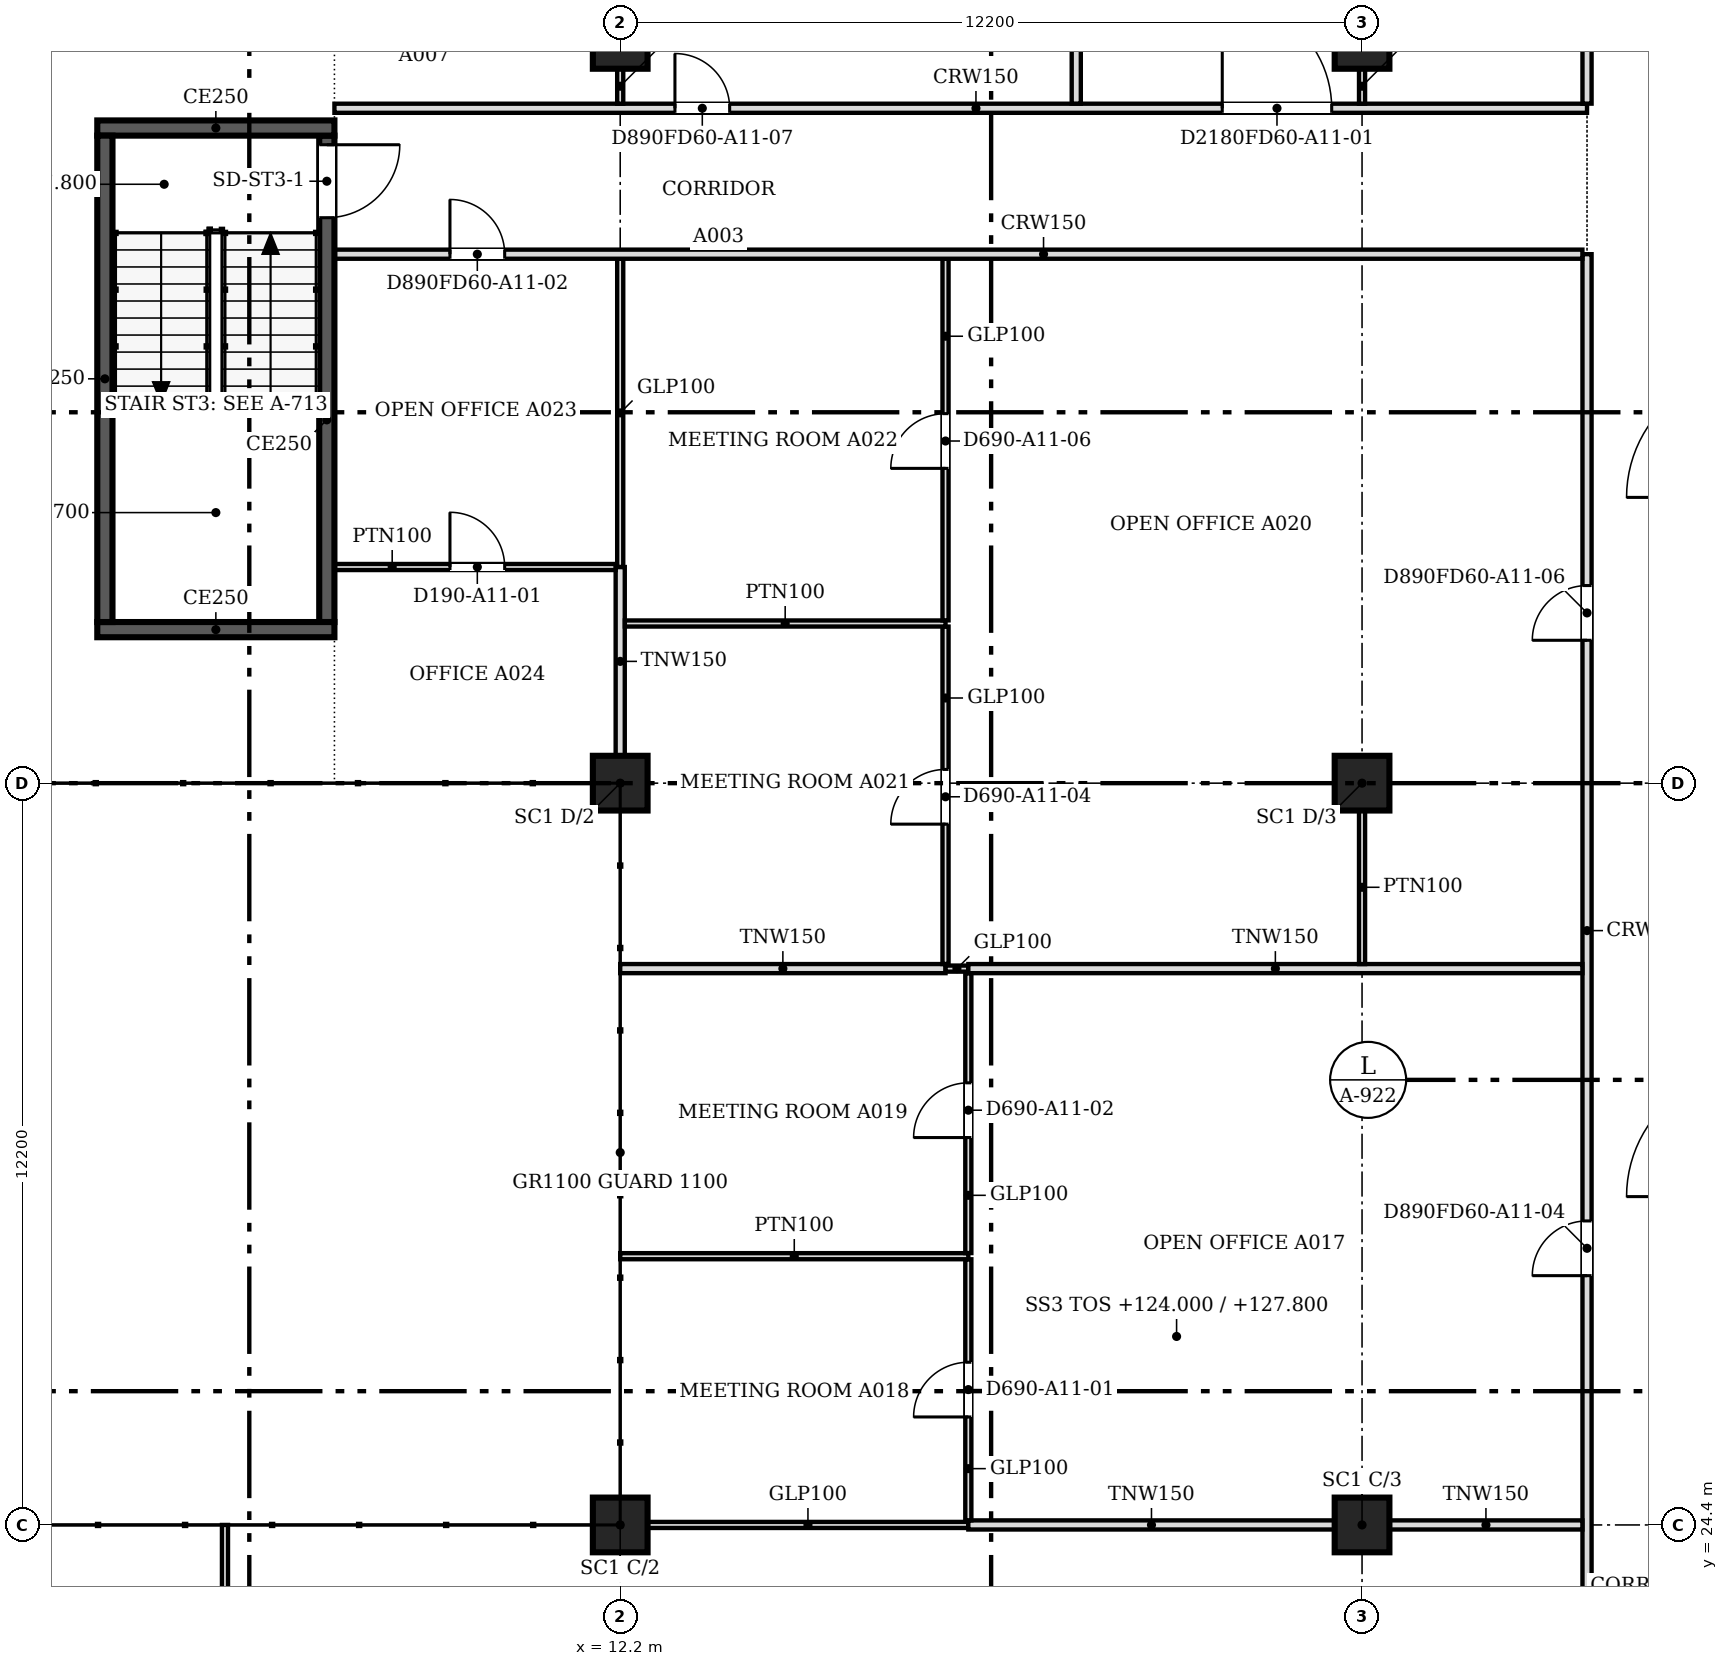
"""IFC4 building model, lengths in metres.
Left out: names, types, materials, properties, quantities, classifications, styles, units other than length and angle.
Written with IfcOpenShell. Run it as: python <this file> out.ifc"""

import sys

from ifc_helpers import new_model, si_unit, direction, frame, frame_2d, origin, origin_2d, place, context, subcontext, project, spatial, rectangle, extrude, source, transform, mapped, element, fill, save


model = new_model("IFC4")
c1 = context("Model", 3, precision=1e-05, world=origin(), true_north=direction((0.0, 1.0)))
c2 = subcontext(c1, "Body", "Model", "MODEL_VIEW")
j1 = project(units=[si_unit("LENGTHUNIT", "METRE"), si_unit("PLANEANGLEUNIT", "RADIAN")], contexts=[c1])
p1 = place(None, origin())
s1 = spatial("IfcSite", under=j1, at=p1, CompositionType="ELEMENT")
p2 = place(p1, origin())
s2 = spatial("IfcBuilding", under=s1, at=p2, CompositionType="ELEMENT")
p3 = place(p2, frame((0.0, 0.0, 124.0)))
s3 = spatial("IfcBuildingStorey", under=s2, at=p3, CompositionType="ELEMENT", Elevation=124.0)
for number, where, z_axis, x_axis in (
    (1, (12.2, 24.4, 0.0), (0.0, 0.0, 1.0), (1.0, 0.0, 0.0)),
    (2, (12.2, 36.6, 0.0), (0.0, 0.0, 1.0), (1.0, 0.0, 0.0)),
    (3, (12.2, 48.8, 0.0), (0.0, 0.0, 1.0), (1.0, 0.0, 0.0)),
    (4, (24.4, 24.4, 0.0), (0.0, 0.0, 1.0), (1.0, 0.0, 0.0)),
    (5, (24.4, 36.6, 0.0), (0.0, 0.0, 1.0), (1.0, 0.0, 0.0)),
    (6, (24.4, 48.8, 0.0), (0.0, 0.0, 1.0), (1.0, 0.0, 0.0)),
):
    element("IfcColumn", number, at=place(p3, frame(where, z_axis=z_axis, x_axis=x_axis)), inside=s3, PredefinedType="COLUMN", context=c2, shape_type="SweptSolid", body=[
        extrude(rectangle(XDim=0.9, YDim=0.9, at=origin_2d()), origin(), (0.0, 0.0, 1.0), 3.6),
    ])
p4 = place(p3, frame((7.5, 39.125, 0.0), z_axis=(0.0, 0.0, 1.0), x_axis=(-1.0, 0.0, 0.0)))
e7 = element("IfcWall", 7, at=p4, inside=s3, PredefinedType="SOLIDWALL", context=c2, shape_type="SweptSolid", body=[
    extrude(rectangle(XDim=3.9, YDim=0.25, at=frame_2d((1.95, 0.0))), origin(), (0.0, 0.0, 1.0), 3.8),
])
p5 = place(p3, frame((3.725, 39.25, 0.0), z_axis=(0.0, 0.0, 1.0), x_axis=(0.0, 1.0, 0.0)))
e8 = element("IfcWall", 8, at=p5, inside=s3, PredefinedType="SOLIDWALL", context=c2, shape_type="SweptSolid", body=[
    extrude(rectangle(XDim=8.0, YDim=0.25, at=frame_2d((4.0, 0.0))), origin(), (0.0, 0.0, 1.0), 3.8),
])
p6 = place(p3, frame((3.6, 47.375, 0.0), z_axis=(0.0, 0.0, 1.0), x_axis=(1.0, 0.0, 0.0)))
e9 = element("IfcWall", 9, at=p6, inside=s3, PredefinedType="SOLIDWALL", context=c2, shape_type="SweptSolid", body=[
    extrude(rectangle(XDim=3.9, YDim=0.25, at=frame_2d((1.95, 0.0))), origin(), (0.0, 0.0, 1.0), 3.8),
])
p7 = place(p3, frame((7.375, 47.25, 0.0), z_axis=(0.0, 0.0, 1.0), x_axis=(0.0, -1.0, 0.0)))
e10 = element("IfcWall", 10, at=p7, inside=s3, PredefinedType="SOLIDWALL", context=c2, shape_type="SweptSolid", body=[
    extrude(rectangle(XDim=8.0, YDim=0.25, at=frame_2d((4.0, 0.0))), origin(), (0.0, 0.0, 1.0), 3.8),
])
m1 = source(origin(), c2, "Body", "SweptSolid", [
    extrude(rectangle(XDim=1.2, YDim=2.1, at=frame_2d((0.6, 1.05))), frame((0.0, 0.135, 0.0), z_axis=(0.0, -1.0, 0.0), x_axis=(1.0, 0.0, 0.0)), (0.0, 0.0, 1.0), 0.27),
])
p8 = place(p7, frame((0.15, 0.0, 0.0)))
e11 = element("IfcOpeningElement", 11, at=p8, cuts=e10, PredefinedType="OPENING", context=c2, shape_type="MappedRepresentation", body=[
    mapped(m1, transform((0.0, 0.0, 0.0), scale=1.0)),
])
p9 = place(p3, frame((28.1, 18.8, 0.0), z_axis=(0.0, 0.0, 1.0), x_axis=(0.0, 1.0, 0.0)))
e12 = element("IfcWall", 12, at=p9, inside=s3, PredefinedType="PARTITIONING", context=c2, shape_type="SweptSolid", body=[
    extrude(rectangle(XDim=26.5, YDim=0.15, at=frame_2d((13.25, 0.0))), origin(), (0.0, 0.0, 1.0), 3.067),
])
m2 = source(origin(), c2, "Body", "SweptSolid", [
    extrude(rectangle(XDim=0.9, YDim=2.1, at=frame_2d((0.45, 1.05))), frame((0.0, 0.085, 0.0), z_axis=(0.0, -1.0, 0.0), x_axis=(1.0, 0.0, 0.0)), (0.0, 0.0, 1.0), 0.17),
])
p10 = place(p9, frame((1.1, 0.0, 0.0)))
e13 = element("IfcOpeningElement", 13, at=p10, cuts=e12, PredefinedType="OPENING", context=c2, shape_type="MappedRepresentation", body=[
    mapped(m2, transform((0.0, 0.0, 0.0), scale=1.0)),
])
p11 = place(p9, frame((9.7, 0.0, 0.0)))
e14 = element("IfcOpeningElement", 14, at=p11, cuts=e12, PredefinedType="OPENING", context=c2, shape_type="MappedRepresentation", body=[
    mapped(m2, transform((0.0, 0.0, 0.0), scale=1.0)),
])
p12 = place(p9, frame((20.15, 0.0, 0.0)))
e15 = element("IfcOpeningElement", 15, at=p12, cuts=e12, PredefinedType="OPENING", context=c2, shape_type="MappedRepresentation", body=[
    mapped(m2, transform((0.0, 0.0, 0.0), scale=1.0)),
])
p13 = place(p3, frame((5.7, 18.99, 0.0), z_axis=(0.0, 0.0, 1.0), x_axis=(0.0, 1.0, 0.0)))
e16 = element("IfcWall", 16, at=p13, inside=s3, PredefinedType="PARTITIONING", context=c2, shape_type="SweptSolid", body=[
    extrude(rectangle(XDim=5.41, YDim=0.1, at=frame_2d((2.705, 0.0))), origin(), (0.0, 0.0, 1.0), 3.067),
])
m3 = source(origin(), c2, "Body", "SweptSolid", [
    extrude(rectangle(XDim=0.9, YDim=2.1, at=frame_2d((0.45, 1.05))), frame((0.0, 0.06, 0.0), z_axis=(0.0, -1.0, 0.0), x_axis=(1.0, 0.0, 0.0)), (0.0, 0.0, 1.0), 0.12),
])
p14 = place(p13, frame((2.3, 0.0, 0.0)))
e17 = element("IfcOpeningElement", 17, at=p14, cuts=e16, PredefinedType="OPENING", context=c2, shape_type="MappedRepresentation", body=[
    mapped(m3, transform((0.0, 0.0, 0.0), scale=1.0)),
])
p15 = place(p3, frame((12.651, 24.4, 0.0), z_axis=(0.0, 0.0, 1.0), x_axis=(1.0, 0.0, 0.0)))
e18 = element("IfcWall", 18, at=p15, inside=s3, PredefinedType="PARTITIONING", context=c2, shape_type="SweptSolid", body=[
    extrude(rectangle(XDim=5.273, YDim=0.1, at=frame_2d((2.637, 0.0))), origin(), (0.0, 0.0, 1.0), 3.067),
])
p16 = place(p3, frame((17.925, 24.4, 0.0), z_axis=(0.0, 0.0, 1.0), x_axis=(1.0, 0.0, 0.0)))
e19 = element("IfcWall", 19, at=p16, inside=s3, PredefinedType="PARTITIONING", context=c2, shape_type="SweptSolid", body=[
    extrude(rectangle(XDim=6.024, YDim=0.15, at=frame_2d((3.012, 0.0))), origin(), (0.0, 0.0, 1.0), 3.067),
])
p17 = place(p3, frame((24.851, 24.4, 0.0), z_axis=(0.0, 0.0, 1.0), x_axis=(1.0, 0.0, 0.0)))
e20 = element("IfcWall", 20, at=p17, inside=s3, PredefinedType="PARTITIONING", context=c2, shape_type="SweptSolid", body=[
    extrude(rectangle(XDim=3.173, YDim=0.15, at=frame_2d((1.586, 0.0))), origin(), (0.0, 0.0, 1.0), 3.067),
])
p18 = place(p3, frame((17.925, 24.476, 0.0), z_axis=(0.0, 0.0, 1.0), x_axis=(0.0, 1.0, 0.0)))
e21 = element("IfcWall", 21, at=p18, inside=s3, PredefinedType="PARTITIONING", context=c2, shape_type="SweptSolid", body=[
    extrude(rectangle(XDim=4.293, YDim=0.1, at=frame_2d((2.146, 0.0))), origin(), (0.0, 0.0, 1.0), 3.067),
])
p19 = place(p18, frame((1.7, 0.0, 0.0)))
e22 = element("IfcOpeningElement", 22, at=p19, cuts=e21, PredefinedType="OPENING", context=c2, shape_type="MappedRepresentation", body=[
    mapped(m3, transform((0.0, 0.0, 0.0), scale=1.0)),
])
p20 = place(p3, frame((12.2, 28.82, 0.0), z_axis=(0.0, 0.0, 1.0), x_axis=(1.0, 0.0, 0.0)))
e23 = element("IfcWall", 23, at=p20, inside=s3, PredefinedType="PARTITIONING", context=c2, shape_type="SweptSolid", body=[
    extrude(rectangle(XDim=5.725, YDim=0.1, at=frame_2d((2.863, 0.0))), origin(), (0.0, 0.0, 1.0), 3.067),
])
p21 = place(p3, frame((17.925, 28.871, 0.0), z_axis=(0.0, 0.0, 1.0), x_axis=(0.0, 1.0, 0.0)))
e24 = element("IfcWall", 24, at=p21, inside=s3, PredefinedType="PARTITIONING", context=c2, shape_type="SweptSolid", body=[
    extrude(rectangle(XDim=4.603, YDim=0.1, at=frame_2d((2.301, 0.0))), origin(), (0.0, 0.0, 1.0), 3.067),
])
p22 = place(p21, frame((1.9, 0.0, 0.0)))
e25 = element("IfcOpeningElement", 25, at=p22, cuts=e24, PredefinedType="OPENING", context=c2, shape_type="MappedRepresentation", body=[
    mapped(m3, transform((0.0, 0.0, 0.0), scale=1.0)),
])
p23 = place(p3, frame((12.2, 33.55, 0.0), z_axis=(0.0, 0.0, 1.0), x_axis=(1.0, 0.0, 0.0)))
e26 = element("IfcWall", 26, at=p23, inside=s3, PredefinedType="PARTITIONING", context=c2, shape_type="SweptSolid", body=[
    extrude(rectangle(XDim=5.35, YDim=0.15, at=frame_2d((2.675, 0.0))), origin(), (0.0, 0.0, 1.0), 3.067),
])
p24 = place(p3, frame((17.551, 33.55, 0.0), z_axis=(0.0, 0.0, 1.0), x_axis=(1.0, 0.0, 0.0)))
e27 = element("IfcWall", 27, at=p24, inside=s3, PredefinedType="PARTITIONING", context=c2, shape_type="SweptSolid", body=[
    extrude(rectangle(XDim=0.373, YDim=0.1, at=frame_2d((0.187, 0.0))), origin(), (0.0, 0.0, 1.0), 3.067),
])
p25 = place(p3, frame((17.925, 33.55, 0.0), z_axis=(0.0, 0.0, 1.0), x_axis=(1.0, 0.0, 0.0)))
e28 = element("IfcWall", 28, at=p25, inside=s3, PredefinedType="PARTITIONING", context=c2, shape_type="SweptSolid", body=[
    extrude(rectangle(XDim=10.099, YDim=0.15, at=frame_2d((5.049, 0.0))), origin(), (0.0, 0.0, 1.0), 3.067),
])
p26 = place(p3, frame((17.55, 33.626, 0.0), z_axis=(0.0, 0.0, 1.0), x_axis=(0.0, 1.0, 0.0)))
e29 = element("IfcWall", 29, at=p26, inside=s3, PredefinedType="PARTITIONING", context=c2, shape_type="SweptSolid", body=[
    extrude(rectangle(XDim=5.549, YDim=0.1, at=frame_2d((2.775, 0.0))), origin(), (0.0, 0.0, 1.0), 3.067),
])
p27 = place(p26, frame((2.3, 0.0, 0.0)))
e30 = element("IfcOpeningElement", 30, at=p27, cuts=e29, PredefinedType="OPENING", context=c2, shape_type="MappedRepresentation", body=[
    mapped(m3, transform((0.0, 0.0, 0.0), scale=1.0)),
])
p28 = place(p3, frame((24.4, 36.15, 0.0), z_axis=(0.0, 0.0, 1.0), x_axis=(0.0, -1.0, 0.0)))
e31 = element("IfcWall", 31, at=p28, inside=s3, PredefinedType="PARTITIONING", context=c2, shape_type="SweptSolid", body=[
    extrude(rectangle(XDim=2.525, YDim=0.1, at=frame_2d((1.262, 0.0))), origin(), (0.0, 0.0, 1.0), 3.067),
])
p29 = place(p3, frame((12.2, 37.051, 0.0), z_axis=(0.0, 0.0, 1.0), x_axis=(0.0, 1.0, 0.0)))
e32 = element("IfcWall", 32, at=p29, inside=s3, PredefinedType="PARTITIONING", context=c2, shape_type="SweptSolid", body=[
    extrude(rectangle(XDim=3.104, YDim=0.15, at=frame_2d((1.552, 0.0))), origin(), (0.0, 0.0, 1.0), 3.067),
])
p30 = place(p3, frame((12.276, 39.226, 0.0), z_axis=(0.0, 0.0, 1.0), x_axis=(1.0, 0.0, 0.0)))
e33 = element("IfcWall", 33, at=p30, inside=s3, PredefinedType="PARTITIONING", context=c2, shape_type="SweptSolid", body=[
    extrude(rectangle(XDim=5.274, YDim=0.1, at=frame_2d((2.637, 0.0))), origin(), (0.0, 0.0, 1.0), 3.067),
])
p31 = place(p3, frame((17.55, 39.277, 0.0), z_axis=(0.0, 0.0, 1.0), x_axis=(0.0, 1.0, 0.0)))
e34 = element("IfcWall", 34, at=p31, inside=s3, PredefinedType="PARTITIONING", context=c2, shape_type="SweptSolid", body=[
    extrude(rectangle(XDim=5.947, YDim=0.1, at=frame_2d((2.973, 0.0))), origin(), (0.0, 0.0, 1.0), 3.067),
])
p32 = place(p31, frame((2.5, 0.0, 0.0)))
e35 = element("IfcOpeningElement", 35, at=p32, cuts=e34, PredefinedType="OPENING", context=c2, shape_type="MappedRepresentation", body=[
    mapped(m3, transform((0.0, 0.0, 0.0), scale=1.0)),
])
p33 = place(p3, frame((12.124, 40.155, 0.0), z_axis=(0.0, 0.0, 1.0), x_axis=(-1.0, 0.0, 0.0)))
e36 = element("IfcWall", 36, at=p33, inside=s3, PredefinedType="PARTITIONING", context=c2, shape_type="SweptSolid", body=[
    extrude(rectangle(XDim=4.624, YDim=0.1, at=frame_2d((2.312, 0.0))), origin(), (0.0, 0.0, 1.0), 3.067),
])
p34 = place(p33, frame((1.824, 0.0, 0.0)))
e37 = element("IfcOpeningElement", 37, at=p34, cuts=e36, PredefinedType="OPENING", context=c2, shape_type="MappedRepresentation", body=[
    mapped(m3, transform((0.0, 0.0, 0.0), scale=1.0)),
])
p35 = place(p3, frame((12.2, 40.156, 0.0), z_axis=(0.0, 0.0, 1.0), x_axis=(0.0, 1.0, 0.0)))
e38 = element("IfcWall", 38, at=p35, inside=s3, PredefinedType="PARTITIONING", context=c2, shape_type="SweptSolid", body=[
    extrude(rectangle(XDim=5.068, YDim=0.1, at=frame_2d((2.534, 0.0))), origin(), (0.0, 0.0, 1.0), 3.067),
])
p36 = place(p3, frame((28.024, 45.3, 0.0), z_axis=(0.0, 0.0, 1.0), x_axis=(-1.0, 0.0, 0.0)))
e39 = element("IfcWall", 39, at=p36, inside=s3, PredefinedType="PARTITIONING", context=c2, shape_type="SweptSolid", body=[
    extrude(rectangle(XDim=20.524, YDim=0.15, at=frame_2d((10.262, 0.0))), origin(), (0.0, 0.0, 1.0), 3.067),
])
p37 = place(p36, frame((17.724, 0.0, 0.0)))
e40 = element("IfcOpeningElement", 40, at=p37, cuts=e39, PredefinedType="OPENING", context=c2, shape_type="MappedRepresentation", body=[
    mapped(m2, transform((0.0, 0.0, 0.0), scale=1.0)),
])
p38 = place(p3, frame((7.5, 47.7, 0.0), z_axis=(0.0, 0.0, 1.0), x_axis=(1.0, 0.0, 0.0)))
e41 = element("IfcWall", 41, at=p38, inside=s3, PredefinedType="PARTITIONING", context=c2, shape_type="SweptSolid", body=[
    extrude(rectangle(XDim=20.6, YDim=0.15, at=frame_2d((10.3, 0.0))), origin(), (0.0, 0.0, 1.0), 3.067),
])
m4 = source(origin(), c2, "Body", "SweptSolid", [
    extrude(rectangle(XDim=1.8, YDim=2.1, at=frame_2d((0.9, 1.05))), frame((0.0, 0.085, 0.0), z_axis=(0.0, -1.0, 0.0), x_axis=(1.0, 0.0, 0.0)), (0.0, 0.0, 1.0), 0.17),
])
p39 = place(p38, frame((14.601, 0.0, 0.0)))
e42 = element("IfcOpeningElement", 42, at=p39, cuts=e41, PredefinedType="OPENING", context=c2, shape_type="MappedRepresentation", body=[
    mapped(m4, transform((0.0, 0.0, 0.0), scale=1.0)),
])
p40 = place(p38, frame((5.6, 0.0, 0.0)))
e43 = element("IfcOpeningElement", 43, at=p40, cuts=e41, PredefinedType="OPENING", context=c2, shape_type="MappedRepresentation", body=[
    mapped(m2, transform((0.0, 0.0, 0.0), scale=1.0)),
])
p41 = place(p3, frame((19.7, 47.776, 0.0), z_axis=(0.0, 0.0, 1.0), x_axis=(0.0, 1.0, 0.0)))
e44 = element("IfcWall", 44, at=p41, inside=s3, PredefinedType="PARTITIONING", context=c2, shape_type="SweptSolid", body=[
    extrude(rectangle(XDim=3.498, YDim=0.15, at=frame_2d((1.749, 0.0))), origin(), (0.0, 0.0, 1.0), 3.067),
])
p42 = place(p3, frame((28.1, 47.776, 0.0), z_axis=(0.0, 0.0, 1.0), x_axis=(0.0, 1.0, 0.0)))
e45 = element("IfcWall", 45, at=p42, inside=s3, PredefinedType="PARTITIONING", context=c2, shape_type="SweptSolid", body=[
    extrude(rectangle(XDim=3.348, YDim=0.15, at=frame_2d((1.674, 0.0))), origin(), (0.0, 0.0, 1.0), 3.067),
])
for number, where, z_axis, x_axis in (
    (46, (12.2, 48.35, 0.0), (0.0, 0.0, 1.0), (0.0, -1.0, 0.0)),
    (47, (24.4, 48.35, 0.0), (0.0, 0.0, 1.0), (0.0, -1.0, 0.0)),
):
    element("IfcWall", number, at=place(p3, frame(where, z_axis=z_axis, x_axis=x_axis)), inside=s3, PredefinedType="PARTITIONING", context=c2, shape_type="SweptSolid", body=[
        extrude(rectangle(XDim=0.575, YDim=0.1, at=frame_2d((0.288, 0.0))), origin(), (0.0, 0.0, 1.0), 3.067),
    ])
m5 = source(origin(), c2, "Body", "SweptSolid", [
    extrude(rectangle(XDim=1.2, YDim=2.1, at=frame_2d((0.6, 1.05))), frame((0.0, 0.025, 0.0), z_axis=(0.0, -1.0, 0.0), x_axis=(1.0, 0.0, 0.0)), (0.0, 0.0, 1.0), 0.05),
])
p43 = place(p8, origin())
e48 = element("IfcDoor", 48, at=p43, inside=s3, OperationType="SINGLE_SWING_LEFT", PredefinedType="DOOR", context=c2, shape_type="MappedRepresentation", body=[
    mapped(m5, transform((0.0, 0.0, 0.0), scale=1.0)),
])
fill(e11, e48)
m6 = source(origin(), c2, "Body", "SweptSolid", [
    extrude(rectangle(XDim=0.9, YDim=2.1, at=frame_2d((0.45, 1.05))), frame((0.0, 0.025, 0.0), z_axis=(0.0, -1.0, 0.0), x_axis=(1.0, 0.0, 0.0)), (0.0, 0.0, 1.0), 0.05),
])
p44 = place(p19, origin())
e49 = element("IfcDoor", 49, at=p44, inside=s3, OperationType="SINGLE_SWING_LEFT", PredefinedType="DOOR", context=c2, shape_type="MappedRepresentation", body=[
    mapped(m6, transform((0.0, 0.0, 0.0), scale=1.0)),
])
fill(e22, e49)
p45 = place(p22, origin())
e50 = element("IfcDoor", 50, at=p45, inside=s3, OperationType="SINGLE_SWING_LEFT", PredefinedType="DOOR", context=c2, shape_type="MappedRepresentation", body=[
    mapped(m6, transform((0.0, 0.0, 0.0), scale=1.0)),
])
fill(e25, e50)
p46 = place(p34, origin())
e51 = element("IfcDoor", 51, at=p46, inside=s3, OperationType="SINGLE_SWING_RIGHT", PredefinedType="DOOR", context=c2, shape_type="MappedRepresentation", body=[
    mapped(m6, transform((0.0, 0.0, 0.0), scale=1.0)),
])
fill(e37, e51)
p47 = place(p37, origin())
e52 = element("IfcDoor", 52, at=p47, inside=s3, OperationType="SINGLE_SWING_RIGHT", PredefinedType="DOOR", context=c2, shape_type="MappedRepresentation", body=[
    mapped(m6, transform((0.0, 0.0, 0.0), scale=1.0)),
])
fill(e40, e52)
p48 = place(p27, origin())
e53 = element("IfcDoor", 53, at=p48, inside=s3, OperationType="SINGLE_SWING_LEFT", PredefinedType="DOOR", context=c2, shape_type="MappedRepresentation", body=[
    mapped(m6, transform((0.0, 0.0, 0.0), scale=1.0)),
])
fill(e30, e53)
p49 = place(p32, origin())
e54 = element("IfcDoor", 54, at=p49, inside=s3, OperationType="SINGLE_SWING_LEFT", PredefinedType="DOOR", context=c2, shape_type="MappedRepresentation", body=[
    mapped(m6, transform((0.0, 0.0, 0.0), scale=1.0)),
])
fill(e35, e54)
m7 = source(origin(), c2, "Body", "SweptSolid", [
    extrude(rectangle(XDim=1.8, YDim=2.1, at=frame_2d((0.9, 1.05))), frame((0.0, 0.025, 0.0), z_axis=(0.0, -1.0, 0.0), x_axis=(1.0, 0.0, 0.0)), (0.0, 0.0, 1.0), 0.05),
])
p50 = place(p39, origin())
e55 = element("IfcDoor", 55, at=p50, inside=s3, OperationType="DOUBLE_DOOR_SINGLE_SWING", PredefinedType="DOOR", context=c2, shape_type="MappedRepresentation", body=[
    mapped(m7, transform((0.0, 0.0, 0.0), scale=1.0)),
])
fill(e42, e55)
p51 = place(p11, origin())
e56 = element("IfcDoor", 56, at=p51, inside=s3, OperationType="SINGLE_SWING_LEFT", PredefinedType="DOOR", context=c2, shape_type="MappedRepresentation", body=[
    mapped(m6, transform((0.0, 0.0, 0.0), scale=1.0)),
])
fill(e14, e56)
p52 = place(p12, origin())
e57 = element("IfcDoor", 57, at=p52, inside=s3, OperationType="SINGLE_SWING_LEFT", PredefinedType="DOOR", context=c2, shape_type="MappedRepresentation", body=[
    mapped(m6, transform((0.0, 0.0, 0.0), scale=1.0)),
])
fill(e15, e57)
p53 = place(p40, origin())
e58 = element("IfcDoor", 58, at=p53, inside=s3, OperationType="SINGLE_SWING_LEFT", PredefinedType="DOOR", context=c2, shape_type="MappedRepresentation", body=[
    mapped(m6, transform((0.0, 0.0, 0.0), scale=1.0)),
])
fill(e43, e58)
save(model, sys.argv[1])
